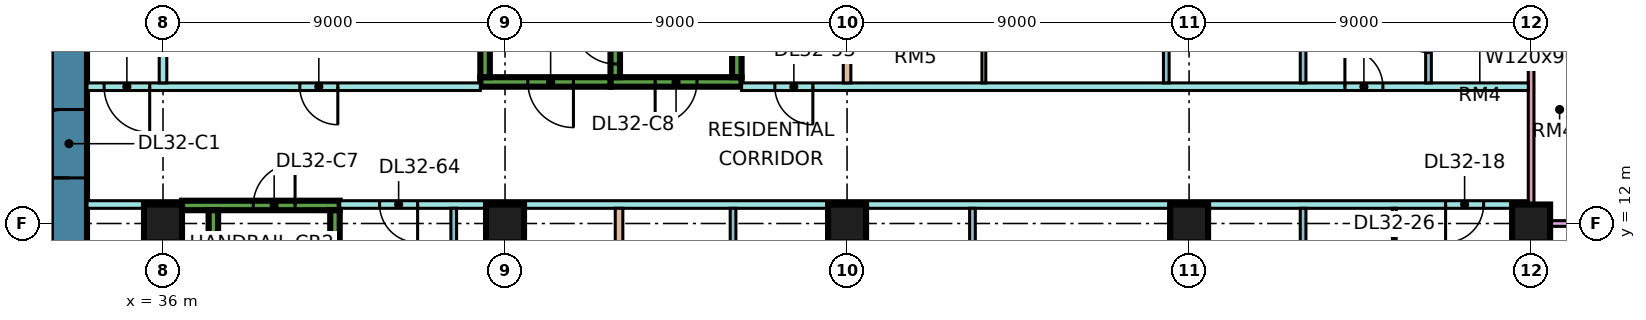
"""IFC4 building model, lengths in metres.
Left out: names, types, materials, properties, quantities, classifications, styles, units other than length and angle.
Written with IfcOpenShell. Run it as: python <this file> out.ifc"""

import sys

from ifc_helpers import new_model, si_unit, direction, frame, frame_2d, origin, origin_2d, place, context, subcontext, project, spatial, rectangle, extrude, element, fill, save


model = new_model("IFC4")
c1 = context("Model", 3, precision=1e-05, world=origin(), true_north=direction((0.0, 1.0)))
c2 = subcontext(c1, "Body", "Model", "MODEL_VIEW")
j1 = project(units=[si_unit("LENGTHUNIT", "METRE"), si_unit("PLANEANGLEUNIT", "RADIAN")], contexts=[c1])
p1 = place(None, origin())
s1 = spatial("IfcSite", under=j1, at=p1, CompositionType="ELEMENT")
p2 = place(p1, origin())
s2 = spatial("IfcBuilding", under=s1, at=p2, CompositionType="ELEMENT")
p3 = place(p2, frame((0.0, 0.0, 136.9)))
s3 = spatial("IfcBuildingStorey", under=s2, at=p3, CompositionType="ELEMENT", Elevation=136.9)
for number, where, z_axis, x_axis in (
    (1, (36.0, 12.0, 0.0), (0.0, 0.0, 1.0), (1.0, 0.0, 0.0)),
    (2, (45.0, 12.0, 0.0), (0.0, 0.0, 1.0), (1.0, 0.0, 0.0)),
    (3, (54.0, 12.0, 0.0), (0.0, 0.0, 1.0), (1.0, 0.0, 0.0)),
    (4, (63.0, 12.0, 0.0), (0.0, 0.0, 1.0), (1.0, 0.0, 0.0)),
    (5, (72.0, 12.0, 0.0), (0.0, 0.0, 1.0), (1.0, 0.0, 0.0)),
):
    element("IfcColumn", number, at=place(p3, frame(where, z_axis=z_axis, x_axis=x_axis)), inside=s3, PredefinedType="COLUMN", context=c2, shape_type="SweptSolid", body=[
        extrude(rectangle(XDim=1.0, YDim=1.0, at=origin_2d()), origin(), (0.0, 0.0, 1.0), 3.75),
    ])
p4 = place(p3, frame((33.525, 7.95, 0.0), z_axis=(0.0, 0.0, 1.0), x_axis=(0.0, 1.0, 0.0)))
e6 = element("IfcWall", 6, at=p4, inside=s3, PredefinedType="SHEAR", context=c2, shape_type="SweptSolid", body=[
    extrude(rectangle(XDim=11.1, YDim=0.95, at=frame_2d((5.55, 0.0))), origin(), (0.0, 0.0, 1.0), 3.75),
])
p5 = place(p4, frame((5.25, 0.0, 0.0)))
e7 = element("IfcOpeningElement", 7, at=p5, cuts=e6, PredefinedType="OPENING", context=c2, shape_type="SweptSolid", body=[
    extrude(rectangle(XDim=1.8, YDim=2.4, at=frame_2d((0.9, 1.2))), frame((0.0, 0.485, 0.0), z_axis=(0.0, -1.0, 0.0), x_axis=(1.0, 0.0, 0.0)), (0.0, 0.0, 1.0), 0.97),
])
p6 = place(p3, frame((36.5, 12.475, 0.0), z_axis=(0.0, 0.0, 1.0), x_axis=(1.0, 0.0, 0.0)))
e8 = element("IfcWall", 8, at=p6, inside=s3, PredefinedType="SHEAR", context=c2, shape_type="SweptSolid", body=[
    extrude(rectangle(XDim=4.15, YDim=0.25, at=frame_2d((2.075, 0.0))), origin(), (0.0, 0.0, 1.0), 3.75),
])
p7 = place(p6, frame((1.875, 0.0, 0.0)))
e9 = element("IfcOpeningElement", 9, at=p7, cuts=e8, PredefinedType="OPENING", context=c2, shape_type="SweptSolid", body=[
    extrude(rectangle(XDim=1.1, YDim=2.2, at=frame_2d((0.55, 1.1))), frame((0.0, 0.135, 0.0), z_axis=(0.0, -1.0, 0.0), x_axis=(1.0, 0.0, 0.0)), (0.0, 0.0, 1.0), 0.27),
])
for number, where, z_axis, x_axis in (
    (10, (37.325, 5.85, 0.0), (0.0, 0.0, 1.0), (0.0, 1.0, 0.0)),
    (11, (40.525, 5.85, 0.0), (0.0, 0.0, 1.0), (0.0, 1.0, 0.0)),
):
    element("IfcWall", number, at=place(p3, frame(where, z_axis=z_axis, x_axis=x_axis)), inside=s3, PredefinedType="SHEAR", context=c2, shape_type="SweptSolid", body=[
        extrude(rectangle(XDim=6.5, YDim=0.25, at=frame_2d((3.25, 0.0))), origin(), (0.0, 0.0, 1.0), 3.75),
    ])
p8 = place(p3, frame((47.775, 15.725, 0.0), z_axis=(0.0, 0.0, 1.0), x_axis=(1.0, 0.0, 0.0)))
e12 = element("IfcWall", 12, at=p8, inside=s3, PredefinedType="SHEAR", context=c2, shape_type="SweptSolid", body=[
    extrude(rectangle(XDim=3.45, YDim=0.25, at=frame_2d((1.725, 0.0))), origin(), (0.0, 0.0, 1.0), 3.75),
])
p9 = place(p8, frame((1.175, 0.0, 0.0)))
e13 = element("IfcOpeningElement", 13, at=p9, cuts=e12, PredefinedType="OPENING", context=c2, shape_type="SweptSolid", body=[
    extrude(rectangle(XDim=1.1, YDim=2.2, at=frame_2d((0.55, 1.1))), frame((0.0, 0.135, 0.0), z_axis=(0.0, -1.0, 0.0), x_axis=(1.0, 0.0, 0.0)), (0.0, 0.0, 1.0), 0.27),
])
p10 = place(p3, frame((47.9, 15.85, 0.0), z_axis=(0.0, 0.0, 1.0), x_axis=(0.0, 1.0, 0.0)))
e14 = element("IfcWall", 14, at=p10, inside=s3, PredefinedType="SHEAR", context=c2, shape_type="SweptSolid", body=[
    extrude(rectangle(XDim=6.5, YDim=0.25, at=frame_2d((3.25, 0.0))), origin(), (0.0, 0.0, 1.0), 3.75),
])
p11 = place(p10, frame((0.35, 0.0, 0.0)))
e15 = element("IfcOpeningElement", 15, at=p11, cuts=e14, PredefinedType="OPENING", context=c2, shape_type="SweptSolid", body=[
    extrude(rectangle(XDim=1.1, YDim=2.2, at=frame_2d((0.55, 1.1))), frame((0.0, 0.135, 0.0), z_axis=(0.0, -1.0, 0.0), x_axis=(1.0, 0.0, 0.0)), (0.0, 0.0, 1.0), 0.27),
])
p12 = place(p3, frame((51.1, 15.85, 0.0), z_axis=(0.0, 0.0, 1.0), x_axis=(0.0, 1.0, 0.0)))
e16 = element("IfcWall", 16, at=p12, inside=s3, PredefinedType="SHEAR", context=c2, shape_type="SweptSolid", body=[
    extrude(rectangle(XDim=6.5, YDim=0.25, at=frame_2d((3.25, 0.0))), origin(), (0.0, 0.0, 1.0), 3.75),
])
p13 = place(p3, frame((44.35, 15.725, 0.0), z_axis=(0.0, 0.0, 1.0), x_axis=(1.0, 0.0, 0.0)))
e17 = element("IfcWall", 17, at=p13, inside=s3, PredefinedType="SHEAR", context=c2, shape_type="SweptSolid", body=[
    extrude(rectangle(XDim=3.425, YDim=0.25, at=frame_2d((1.712, 0.0))), origin(), (0.0, 0.0, 1.0), 3.75),
])
p14 = place(p13, frame((1.25, 0.0, 0.0)))
e18 = element("IfcOpeningElement", 18, at=p14, cuts=e17, PredefinedType="OPENING", context=c2, shape_type="SweptSolid", body=[
    extrude(rectangle(XDim=1.2, YDim=2.2, at=frame_2d((0.6, 1.1))), frame((0.0, 0.135, 0.0), z_axis=(0.0, -1.0, 0.0), x_axis=(1.0, 0.0, 0.0)), (0.0, 0.0, 1.0), 0.27),
])
p15 = place(p3, frame((44.475, 15.85, 0.0), z_axis=(0.0, 0.0, 1.0), x_axis=(0.0, 1.0, 0.0)))
e19 = element("IfcWall", 19, at=p15, inside=s3, PredefinedType="SHEAR", context=c2, shape_type="SweptSolid", body=[
    extrude(rectangle(XDim=6.5, YDim=0.25, at=frame_2d((3.25, 0.0))), origin(), (0.0, 0.0, 1.0), 3.75),
])
p16 = place(p15, frame((1.75, 0.0, 0.0)))
e20 = element("IfcOpeningElement", 20, at=p16, cuts=e19, PredefinedType="OPENING", context=c2, shape_type="SweptSolid", body=[
    extrude(rectangle(XDim=1.1, YDim=2.2, at=frame_2d((0.55, 1.1))), frame((0.0, 0.135, 0.0), z_axis=(0.0, -1.0, 0.0), x_axis=(1.0, 0.0, 0.0)), (0.0, 0.0, 1.0), 0.27),
])
p17 = place(p15, frame((4.3, 0.0, 0.0)))
e21 = element("IfcOpeningElement", 21, at=p17, cuts=e19, PredefinedType="OPENING", context=c2, shape_type="SweptSolid", body=[
    extrude(rectangle(XDim=1.1, YDim=2.2, at=frame_2d((0.55, 1.1))), frame((0.0, 0.135, 0.0), z_axis=(0.0, -1.0, 0.0), x_axis=(1.0, 0.0, 0.0)), (0.0, 0.0, 1.0), 0.27),
])
p18 = place(p3, frame((72.0, 12.075, 0.0), z_axis=(0.0, 0.0, 1.0), x_axis=(0.0, 1.0, 0.0)))
e22 = element("IfcWall", 22, at=p18, inside=s3, PredefinedType="SOLIDWALL", context=c2, shape_type="SweptSolid", body=[
    extrude(rectangle(XDim=10.35, YDim=0.15, at=frame_2d((5.175, 0.0))), origin(), (0.0, 0.0, 1.0), 3.3),
])
p19 = place(p18, frame((4.275, 0.0, 1.7)))
e23 = element("IfcOpeningElement", 23, at=p19, cuts=e22, PredefinedType="OPENING", context=c2, shape_type="SweptSolid", body=[
    extrude(rectangle(XDim=1.2, YDim=0.9, at=frame_2d((0.6, 0.45))), frame((0.0, 0.085, 0.0), z_axis=(0.0, -1.0, 0.0), x_axis=(1.0, 0.0, 0.0)), (0.0, 0.0, 1.0), 0.17),
])
p20 = place(p18, frame((7.988, 0.0, 0.45)))
e24 = element("IfcOpeningElement", 24, at=p20, cuts=e22, PredefinedType="OPENING", context=c2, shape_type="SweptSolid", body=[
    extrude(rectangle(XDim=1.8, YDim=2.4, at=frame_2d((0.9, 1.2))), frame((0.0, 0.085, 0.0), z_axis=(0.0, -1.0, 0.0), x_axis=(1.0, 0.0, 0.0)), (0.0, 0.0, 1.0), 0.17),
])
p21 = place(p3, frame((73.5, 12.0, 0.0), z_axis=(0.0, 0.0, 1.0), x_axis=(-1.0, 0.0, 0.0)))
e25 = element("IfcWall", 25, at=p21, inside=s3, PredefinedType="SOLIDWALL", context=c2, shape_type="SweptSolid", body=[
    extrude(rectangle(XDim=1.5, YDim=0.15, at=frame_2d((0.75, 0.0))), origin(), (0.0, 0.0, 1.0), 3.3),
])
p22 = place(p3, frame((34.0, 12.5, 0.0), z_axis=(0.0, 0.0, 1.0), x_axis=(1.0, 0.0, 0.0)))
e26 = element("IfcWall", 26, at=p22, inside=s3, PredefinedType="PARTITIONING", context=c2, shape_type="SweptSolid", body=[
    extrude(rectangle(XDim=2.501, YDim=0.2, at=frame_2d((1.25, 0.0))), origin(), (0.0, 0.0, 1.0), 3.3),
])
p23 = place(p3, frame((34.0, 15.6, 0.0), z_axis=(0.0, 0.0, 1.0), x_axis=(1.0, 0.0, 0.0)))
e27 = element("IfcWall", 27, at=p23, inside=s3, PredefinedType="PARTITIONING", context=c2, shape_type="SweptSolid", body=[
    extrude(rectangle(XDim=10.35, YDim=0.2, at=frame_2d((5.175, 0.0))), origin(), (0.0, 0.0, 1.0), 3.3),
])
p24 = place(p23, frame((5.6, 0.0, 0.0)))
e28 = element("IfcOpeningElement", 28, at=p24, cuts=e27, PredefinedType="OPENING", context=c2, shape_type="SweptSolid", body=[
    extrude(rectangle(XDim=1.0, YDim=2.1, at=frame_2d((0.5, 1.05))), frame((0.0, 0.11, 0.0), z_axis=(0.0, -1.0, 0.0), x_axis=(1.0, 0.0, 0.0)), (0.0, 0.0, 1.0), 0.22),
])
p25 = place(p23, frame((0.45, 0.0, 0.0)))
e29 = element("IfcOpeningElement", 29, at=p25, cuts=e27, PredefinedType="OPENING", context=c2, shape_type="SweptSolid", body=[
    extrude(rectangle(XDim=1.2, YDim=2.1, at=frame_2d((0.6, 1.05))), frame((0.0, 0.11, 0.0), z_axis=(0.0, -1.0, 0.0), x_axis=(1.0, 0.0, 0.0)), (0.0, 0.0, 1.0), 0.22),
])
p26 = place(p3, frame((36.0, 15.7, 0.0), z_axis=(0.0, 0.0, 1.0), x_axis=(0.0, 1.0, 0.0)))
e30 = element("IfcWall", 30, at=p26, inside=s3, PredefinedType="PARTITIONING", context=c2, shape_type="SweptSolid", body=[
    extrude(rectangle(XDim=8.3, YDim=0.2, at=frame_2d((4.15, 0.0))), origin(), (0.0, 0.0, 1.0), 3.3),
])
p27 = place(p3, frame((40.65, 12.5, 0.0), z_axis=(0.0, 0.0, 1.0), x_axis=(1.0, 0.0, 0.0)))
e31 = element("IfcWall", 31, at=p27, inside=s3, PredefinedType="PARTITIONING", context=c2, shape_type="SweptSolid", body=[
    extrude(rectangle(XDim=31.276, YDim=0.2, at=frame_2d((15.638, 0.0))), origin(), (0.0, 0.0, 1.0), 3.3),
])
p28 = place(p27, frame((29.1, 0.0, 0.0)))
e32 = element("IfcOpeningElement", 32, at=p28, cuts=e31, PredefinedType="OPENING", context=c2, shape_type="SweptSolid", body=[
    extrude(rectangle(XDim=1.0, YDim=2.1, at=frame_2d((0.5, 1.05))), frame((0.0, 0.11, 0.0), z_axis=(0.0, -1.0, 0.0), x_axis=(1.0, 0.0, 0.0)), (0.0, 0.0, 1.0), 0.22),
])
p29 = place(p27, frame((1.05, 0.0, 0.0)))
e33 = element("IfcOpeningElement", 33, at=p29, cuts=e31, PredefinedType="OPENING", context=c2, shape_type="SweptSolid", body=[
    extrude(rectangle(XDim=1.0, YDim=2.1, at=frame_2d((0.5, 1.05))), frame((0.0, 0.11, 0.0), z_axis=(0.0, -1.0, 0.0), x_axis=(1.0, 0.0, 0.0)), (0.0, 0.0, 1.0), 0.22),
])
p30 = place(p3, frame((43.65, 5.825, 0.0), z_axis=(0.0, 0.0, 1.0), x_axis=(0.0, 1.0, 0.0)))
e34 = element("IfcWall", 34, at=p30, inside=s3, PredefinedType="PARTITIONING", context=c2, shape_type="SweptSolid", body=[
    extrude(rectangle(XDim=6.575, YDim=0.15, at=frame_2d((3.288, 0.0))), origin(), (0.0, 0.0, 1.0), 3.3),
])
p31 = place(p30, frame((4.425, 0.0, 0.0)))
e35 = element("IfcOpeningElement", 35, at=p31, cuts=e34, PredefinedType="OPENING", context=c2, shape_type="SweptSolid", body=[
    extrude(rectangle(XDim=0.9, YDim=2.1, at=frame_2d((0.45, 1.05))), frame((0.0, 0.085, 0.0), z_axis=(0.0, -1.0, 0.0), x_axis=(1.0, 0.0, 0.0)), (0.0, 0.0, 1.0), 0.17),
])
p32 = place(p3, frame((48.0, 0.0, 0.0), z_axis=(0.0, 0.0, 1.0), x_axis=(0.0, 1.0, 0.0)))
e36 = element("IfcWall", 36, at=p32, inside=s3, PredefinedType="PARTITIONING", context=c2, shape_type="SweptSolid", body=[
    extrude(rectangle(XDim=12.4, YDim=0.2, at=frame_2d((6.2, 0.0))), origin(), (0.0, 0.0, 1.0), 3.3),
])
p33 = place(p3, frame((51.0, 7.175, 0.0), z_axis=(0.0, 0.0, 1.0), x_axis=(0.0, 1.0, 0.0)))
e37 = element("IfcWall", 37, at=p33, inside=s3, PredefinedType="PARTITIONING", context=c2, shape_type="SweptSolid", body=[
    extrude(rectangle(XDim=5.225, YDim=0.15, at=frame_2d((2.612, 0.0))), origin(), (0.0, 0.0, 1.0), 3.3),
])
p34 = place(p3, frame((51.225, 15.6, 0.0), z_axis=(0.0, 0.0, 1.0), x_axis=(1.0, 0.0, 0.0)))
e38 = element("IfcWall", 38, at=p34, inside=s3, PredefinedType="PARTITIONING", context=c2, shape_type="SweptSolid", body=[
    extrude(rectangle(XDim=20.701, YDim=0.2, at=frame_2d((10.351, 0.0))), origin(), (0.0, 0.0, 1.0), 3.3),
])
p35 = place(p34, frame((15.875, 0.0, 0.0)))
e39 = element("IfcOpeningElement", 39, at=p35, cuts=e38, PredefinedType="OPENING", context=c2, shape_type="SweptSolid", body=[
    extrude(rectangle(XDim=1.0, YDim=2.1, at=frame_2d((0.5, 1.05))), frame((0.0, 0.11, 0.0), z_axis=(0.0, -1.0, 0.0), x_axis=(1.0, 0.0, 0.0)), (0.0, 0.0, 1.0), 0.22),
])
p36 = place(p34, frame((0.875, 0.0, 0.0)))
e40 = element("IfcOpeningElement", 40, at=p36, cuts=e38, PredefinedType="OPENING", context=c2, shape_type="SweptSolid", body=[
    extrude(rectangle(XDim=1.0, YDim=2.1, at=frame_2d((0.5, 1.05))), frame((0.0, 0.11, 0.0), z_axis=(0.0, -1.0, 0.0), x_axis=(1.0, 0.0, 0.0)), (0.0, 0.0, 1.0), 0.22),
])
p37 = place(p3, frame((53.7, 7.175, 0.0), z_axis=(0.0, 0.0, 1.0), x_axis=(0.0, 1.0, 0.0)))
e41 = element("IfcWall", 41, at=p37, inside=s3, PredefinedType="PARTITIONING", context=c2, shape_type="SweptSolid", body=[
    extrude(rectangle(XDim=5.225, YDim=0.15, at=frame_2d((2.612, 0.0))), origin(), (0.0, 0.0, 1.0), 3.3),
])
p38 = place(p3, frame((54.0, 15.7, 0.0), z_axis=(0.0, 0.0, 1.0), x_axis=(0.0, 1.0, 0.0)))
e42 = element("IfcWall", 42, at=p38, inside=s3, PredefinedType="PARTITIONING", context=c2, shape_type="SweptSolid", body=[
    extrude(rectangle(XDim=8.3, YDim=0.2, at=frame_2d((4.15, 0.0))), origin(), (0.0, 0.0, 1.0), 3.3),
])
p39 = place(p3, frame((57.3, 7.175, 0.0), z_axis=(0.0, 0.0, 1.0), x_axis=(0.0, 1.0, 0.0)))
e43 = element("IfcWall", 43, at=p39, inside=s3, PredefinedType="PARTITIONING", context=c2, shape_type="SweptSolid", body=[
    extrude(rectangle(XDim=5.225, YDim=0.15, at=frame_2d((2.612, 0.0))), origin(), (0.0, 0.0, 1.0), 3.3),
])
p40 = place(p3, frame((57.6, 15.7, 0.0), z_axis=(0.0, 0.0, 1.0), x_axis=(0.0, 1.0, 0.0)))
e44 = element("IfcWall", 44, at=p40, inside=s3, PredefinedType="PARTITIONING", context=c2, shape_type="SweptSolid", body=[
    extrude(rectangle(XDim=2.525, YDim=0.1, at=frame_2d((1.263, 0.0))), origin(), (0.0, 0.0, 1.0), 3.3),
])
p41 = place(p3, frame((62.4, 15.7, 0.0), z_axis=(0.0, 0.0, 1.0), x_axis=(0.0, 1.0, 0.0)))
e45 = element("IfcWall", 45, at=p41, inside=s3, PredefinedType="PARTITIONING", context=c2, shape_type="SweptSolid", body=[
    extrude(rectangle(XDim=2.525, YDim=0.15, at=frame_2d((1.263, 0.0))), origin(), (0.0, 0.0, 1.0), 3.3),
])
for number, where, z_axis, x_axis in (
    (46, (63.0, 7.175, 0.0), (0.0, 0.0, 1.0), (0.0, 1.0, 0.0)),
    (47, (66.0, 7.175, 0.0), (0.0, 0.0, 1.0), (0.0, 1.0, 0.0)),
):
    element("IfcWall", number, at=place(p3, frame(where, z_axis=z_axis, x_axis=x_axis)), inside=s3, PredefinedType="PARTITIONING", context=c2, shape_type="SweptSolid", body=[
        extrude(rectangle(XDim=5.225, YDim=0.15, at=frame_2d((2.612, 0.0))), origin(), (0.0, 0.0, 1.0), 3.3),
    ])
p42 = place(p3, frame((66.0, 15.7, 0.0), z_axis=(0.0, 0.0, 1.0), x_axis=(0.0, 1.0, 0.0)))
e48 = element("IfcWall", 48, at=p42, inside=s3, PredefinedType="PARTITIONING", context=c2, shape_type="SweptSolid", body=[
    extrude(rectangle(XDim=2.525, YDim=0.15, at=frame_2d((1.263, 0.0))), origin(), (0.0, 0.0, 1.0), 3.3),
])
p43 = place(p42, frame((0.9, 0.0, 0.0)))
e49 = element("IfcOpeningElement", 49, at=p43, cuts=e48, PredefinedType="OPENING", context=c2, shape_type="SweptSolid", body=[
    extrude(rectangle(XDim=0.8, YDim=2.1, at=frame_2d((0.4, 1.05))), frame((0.0, 0.085, 0.0), z_axis=(0.0, -1.0, 0.0), x_axis=(1.0, 0.0, 0.0)), (0.0, 0.0, 1.0), 0.17),
])
p44 = place(p3, frame((68.4, 7.175, 0.0), z_axis=(0.0, 0.0, 1.0), x_axis=(0.0, 1.0, 0.0)))
e50 = element("IfcWall", 50, at=p44, inside=s3, PredefinedType="PARTITIONING", context=c2, shape_type="SweptSolid", body=[
    extrude(rectangle(XDim=5.225, YDim=0.1, at=frame_2d((2.612, 0.0))), origin(), (0.0, 0.0, 1.0), 3.3),
])
p45 = place(p44, frame((2.175, 0.0, 0.0)))
e51 = element("IfcOpeningElement", 51, at=p45, cuts=e50, PredefinedType="OPENING", context=c2, shape_type="SweptSolid", body=[
    extrude(rectangle(XDim=0.9, YDim=2.1, at=frame_2d((0.45, 1.05))), frame((0.0, 0.06, 0.0), z_axis=(0.0, -1.0, 0.0), x_axis=(1.0, 0.0, 0.0)), (0.0, 0.0, 1.0), 0.12),
])
p46 = place(p3, frame((69.3, 15.7, 0.0), z_axis=(0.0, 0.0, 1.0), x_axis=(0.0, 1.0, 0.0)))
e52 = element("IfcWall", 52, at=p46, inside=s3, PredefinedType="PARTITIONING", context=c2, shape_type="SweptSolid", body=[
    extrude(rectangle(XDim=2.675, YDim=0.15, at=frame_2d((1.337, 0.0))), origin(), (0.0, 0.0, 1.0), 3.3),
])
p47 = place(p46, frame((0.8, 0.0, 0.0)))
e53 = element("IfcOpeningElement", 53, at=p47, cuts=e52, PredefinedType="OPENING", context=c2, shape_type="SweptSolid", body=[
    extrude(rectangle(XDim=0.8, YDim=2.1, at=frame_2d((0.4, 1.05))), frame((0.0, 0.085, 0.0), z_axis=(0.0, -1.0, 0.0), x_axis=(1.0, 0.0, 0.0)), (0.0, 0.0, 1.0), 0.17),
])
p48 = place(p19, origin())
e54 = element("IfcWindow", 54, at=p48, inside=s3, PartitioningType="SINGLE_PANEL", PredefinedType="WINDOW", context=c2, shape_type="SweptSolid", body=[
    extrude(rectangle(XDim=1.2, YDim=0.9, at=frame_2d((0.6, 0.45))), frame((0.0, 0.03, 0.0), z_axis=(0.0, -1.0, 0.0), x_axis=(1.0, 0.0, 0.0)), (0.0, 0.0, 1.0), 0.06),
])
fill(e23, e54)
p49 = place(p5, origin())
e55 = element("IfcDoor", 55, at=p49, inside=s3, OperationType="DOUBLE_DOOR_SINGLE_SWING", PredefinedType="DOOR", context=c2, shape_type="SweptSolid", body=[
    extrude(rectangle(XDim=1.8, YDim=2.4, at=frame_2d((0.9, 1.2))), frame((0.0, 0.025, 0.0), z_axis=(0.0, -1.0, 0.0), x_axis=(1.0, 0.0, 0.0)), (0.0, 0.0, 1.0), 0.05),
])
fill(e7, e55)
p50 = place(p7, frame((1.1, 0.0, 0.0), z_axis=(0.0, 0.0, 1.0), x_axis=(-1.0, 0.0, 0.0)))
e56 = element("IfcDoor", 56, at=p50, inside=s3, OperationType="SINGLE_SWING_RIGHT", PredefinedType="DOOR", context=c2, shape_type="SweptSolid", body=[
    extrude(rectangle(XDim=1.1, YDim=2.2, at=frame_2d((0.55, 1.1))), frame((0.0, 0.025, 0.0), z_axis=(0.0, -1.0, 0.0), x_axis=(1.0, 0.0, 0.0)), (0.0, 0.0, 1.0), 0.05),
])
fill(e9, e56)
p51 = place(p9, frame((1.1, 0.0, 0.0), z_axis=(0.0, 0.0, 1.0), x_axis=(-1.0, 0.0, 0.0)))
e57 = element("IfcDoor", 57, at=p51, inside=s3, OperationType="SINGLE_SWING_LEFT", PredefinedType="DOOR", context=c2, shape_type="SweptSolid", body=[
    extrude(rectangle(XDim=1.1, YDim=2.2, at=frame_2d((0.55, 1.1))), frame((0.0, 0.025, 0.0), z_axis=(0.0, -1.0, 0.0), x_axis=(1.0, 0.0, 0.0)), (0.0, 0.0, 1.0), 0.05),
])
fill(e13, e57)
p52 = place(p14, origin())
e58 = element("IfcDoor", 58, at=p52, inside=s3, OperationType="SINGLE_SWING_RIGHT", PredefinedType="DOOR", context=c2, shape_type="SweptSolid", body=[
    extrude(rectangle(XDim=1.2, YDim=2.2, at=frame_2d((0.6, 1.1))), frame((0.0, 0.025, 0.0), z_axis=(0.0, -1.0, 0.0), x_axis=(1.0, 0.0, 0.0)), (0.0, 0.0, 1.0), 0.05),
])
fill(e18, e58)
p53 = place(p11, frame((1.1, 0.0, 0.0), z_axis=(0.0, 0.0, 1.0), x_axis=(-1.0, 0.0, 0.0)))
e59 = element("IfcDoor", 59, at=p53, inside=s3, OperationType="SINGLE_SWING_RIGHT", PredefinedType="DOOR", context=c2, shape_type="SweptSolid", body=[
    extrude(rectangle(XDim=1.1, YDim=2.2, at=frame_2d((0.55, 1.1))), frame((0.0, 0.025, 0.0), z_axis=(0.0, -1.0, 0.0), x_axis=(1.0, 0.0, 0.0)), (0.0, 0.0, 1.0), 0.05),
])
fill(e15, e59)
p54 = place(p24, origin())
e60 = element("IfcDoor", 60, at=p54, inside=s3, OperationType="SINGLE_SWING_RIGHT", PredefinedType="DOOR", context=c2, shape_type="SweptSolid", body=[
    extrude(rectangle(XDim=1.0, YDim=2.1, at=frame_2d((0.5, 1.05))), frame((0.0, 0.025, 0.0), z_axis=(0.0, -1.0, 0.0), x_axis=(1.0, 0.0, 0.0)), (0.0, 0.0, 1.0), 0.05),
])
fill(e28, e60)
p55 = place(p47, frame((0.8, 0.0, 0.0), z_axis=(0.0, 0.0, 1.0), x_axis=(-1.0, 0.0, 0.0)))
e61 = element("IfcDoor", 61, at=p55, inside=s3, OperationType="SINGLE_SWING_RIGHT", PredefinedType="DOOR", context=c2, shape_type="SweptSolid", body=[
    extrude(rectangle(XDim=0.8, YDim=2.1, at=frame_2d((0.4, 1.05))), frame((0.0, 0.025, 0.0), z_axis=(0.0, -1.0, 0.0), x_axis=(1.0, 0.0, 0.0)), (0.0, 0.0, 1.0), 0.05),
])
fill(e53, e61)
p56 = place(p35, origin())
e62 = element("IfcDoor", 62, at=p56, inside=s3, OperationType="SINGLE_SWING_LEFT", PredefinedType="DOOR", context=c2, shape_type="SweptSolid", body=[
    extrude(rectangle(XDim=1.0, YDim=2.1, at=frame_2d((0.5, 1.05))), frame((0.0, 0.025, 0.0), z_axis=(0.0, -1.0, 0.0), x_axis=(1.0, 0.0, 0.0)), (0.0, 0.0, 1.0), 0.05),
])
fill(e39, e62)
p57 = place(p28, frame((1.0, 0.0, 0.0), z_axis=(0.0, 0.0, 1.0), x_axis=(-1.0, 0.0, 0.0)))
e63 = element("IfcDoor", 63, at=p57, inside=s3, OperationType="SINGLE_SWING_LEFT", PredefinedType="DOOR", context=c2, shape_type="SweptSolid", body=[
    extrude(rectangle(XDim=1.0, YDim=2.1, at=frame_2d((0.5, 1.05))), frame((0.0, 0.025, 0.0), z_axis=(0.0, -1.0, 0.0), x_axis=(1.0, 0.0, 0.0)), (0.0, 0.0, 1.0), 0.05),
])
fill(e32, e63)
p58 = place(p25, origin())
e64 = element("IfcDoor", 64, at=p58, inside=s3, OperationType="SINGLE_SWING_RIGHT", PredefinedType="DOOR", context=c2, shape_type="SweptSolid", body=[
    extrude(rectangle(XDim=1.2, YDim=2.1, at=frame_2d((0.6, 1.05))), frame((0.0, 0.025, 0.0), z_axis=(0.0, -1.0, 0.0), x_axis=(1.0, 0.0, 0.0)), (0.0, 0.0, 1.0), 0.05),
])
fill(e29, e64)
p59 = place(p36, origin())
e65 = element("IfcDoor", 65, at=p59, inside=s3, OperationType="SINGLE_SWING_RIGHT", PredefinedType="DOOR", context=c2, shape_type="SweptSolid", body=[
    extrude(rectangle(XDim=1.0, YDim=2.1, at=frame_2d((0.5, 1.05))), frame((0.0, 0.025, 0.0), z_axis=(0.0, -1.0, 0.0), x_axis=(1.0, 0.0, 0.0)), (0.0, 0.0, 1.0), 0.05),
])
fill(e40, e65)
p60 = place(p29, origin())
e66 = element("IfcDoor", 66, at=p60, inside=s3, OperationType="SINGLE_SWING_RIGHT", PredefinedType="DOOR", context=c2, shape_type="SweptSolid", body=[
    extrude(rectangle(XDim=1.0, YDim=2.1, at=frame_2d((0.5, 1.05))), frame((0.0, 0.025, 0.0), z_axis=(0.0, -1.0, 0.0), x_axis=(1.0, 0.0, 0.0)), (0.0, 0.0, 1.0), 0.05),
])
fill(e33, e66)
save(model, sys.argv[1])
